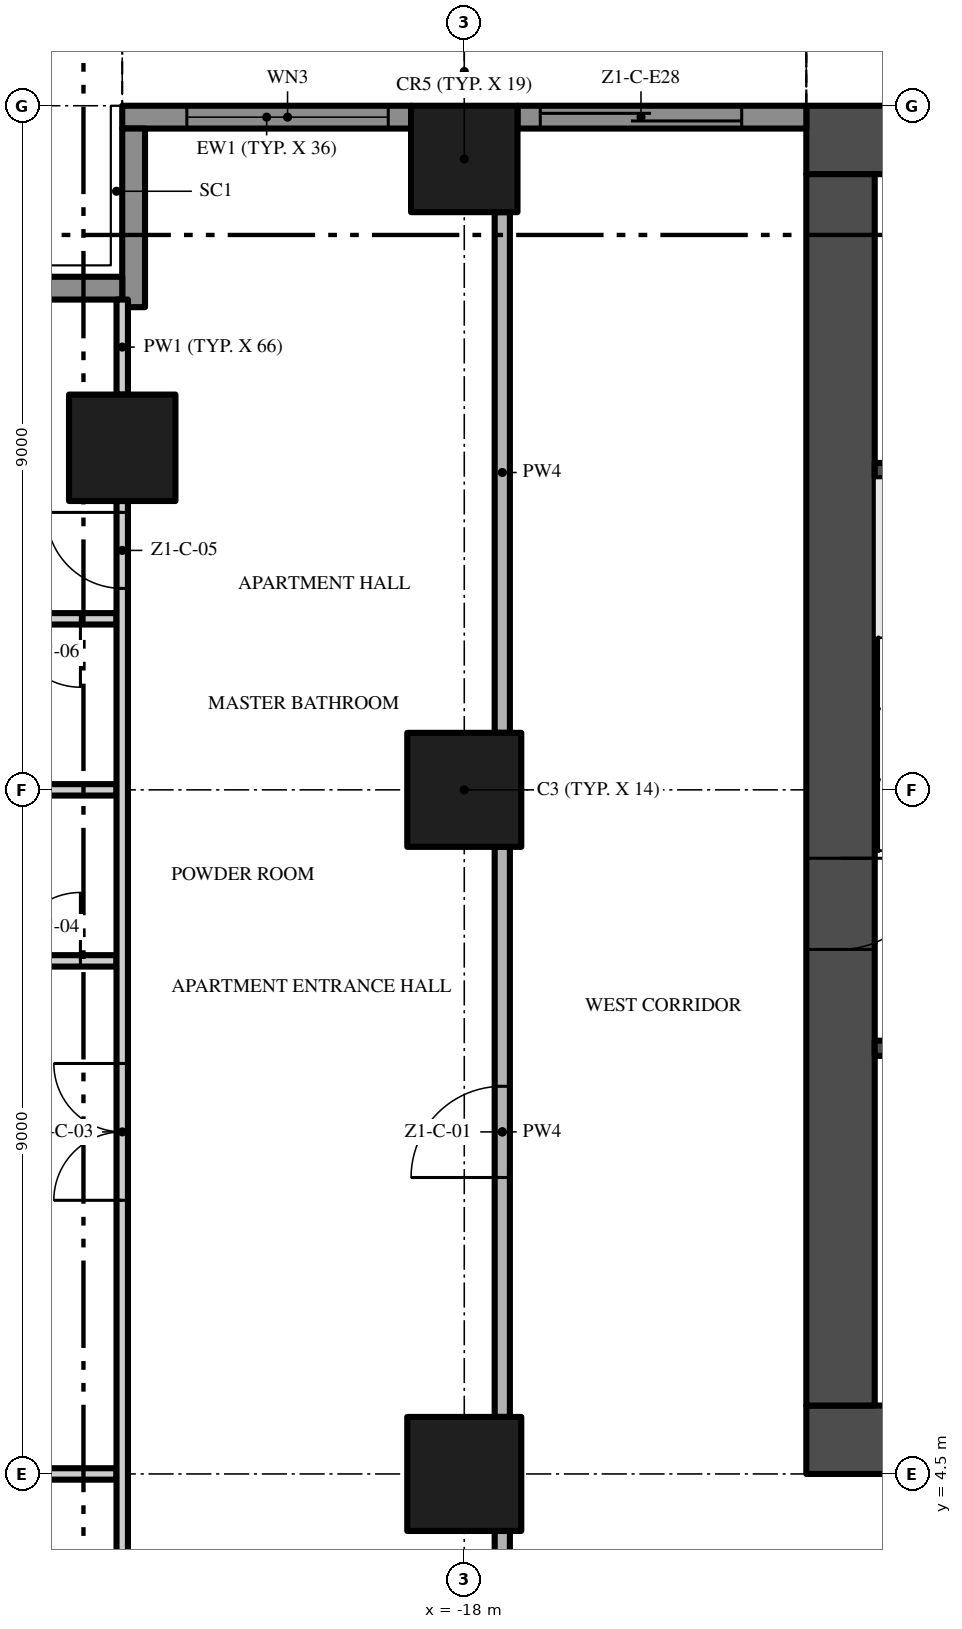
"""IFC4 building model, lengths in metres.
Left out: names, types, materials, properties, quantities, classifications, styles, units other than length and angle.
Written with IfcOpenShell. Run it as: python <this file> out.ifc"""

import sys

from ifc_helpers import new_model, si_unit, direction, frame, frame_2d, origin, origin_2d, place, context, subcontext, project, spatial, rectangle, extrude, element, fill, save


model = new_model("IFC4")
c1 = context("Model", 3, precision=1e-05, world=origin(), true_north=direction((0.0, 1.0)))
c2 = subcontext(c1, "Body", "Model", "MODEL_VIEW")
j1 = project(units=[si_unit("LENGTHUNIT", "METRE"), si_unit("PLANEANGLEUNIT", "RADIAN")], contexts=[c1])
p1 = place(None, origin())
s1 = spatial("IfcSite", under=j1, at=p1, CompositionType="ELEMENT")
p2 = place(p1, origin())
s2 = spatial("IfcBuilding", under=s1, at=p2, CompositionType="ELEMENT")
p3 = place(p2, frame((0.0, 0.0, 45.4)))
s3 = spatial("IfcBuildingStorey", under=s2, at=p3, CompositionType="ELEMENT", Elevation=45.4)
p4 = place(p3, frame((-13.5, 4.95, -0.3), z_axis=(0.0, 0.0, 1.0), x_axis=(1.0, 0.0, 0.0)))
e1 = element("IfcWall", 1, at=p4, inside=s3, PredefinedType="SHEAR", context=c2, shape_type="SweptSolid", body=[
    extrude(rectangle(XDim=27.0, YDim=0.9, at=frame_2d((13.5, 0.0))), origin(), (0.0, 0.0, 1.0), 3.8),
])
p5 = place(p4, frame((12.0, 0.0, 0.3)))
e2 = element("IfcOpeningElement", 2, at=p5, cuts=e1, PredefinedType="OPENING", context=c2, shape_type="SweptSolid", body=[
    extrude(rectangle(XDim=3.0, YDim=2.4, at=frame_2d((1.5, 1.2))), frame((0.0, 0.46, 0.0), z_axis=(0.0, -1.0, 0.0), x_axis=(1.0, 0.0, 0.0)), (0.0, 0.0, 1.0), 0.92),
])
p6 = place(p4, frame((4.9, 0.0, 0.3)))
e3 = element("IfcOpeningElement", 3, at=p6, cuts=e1, PredefinedType="OPENING", context=c2, shape_type="SweptSolid", body=[
    extrude(rectangle(XDim=1.2, YDim=2.2, at=frame_2d((0.6, 1.1))), frame((0.0, 0.46, 0.0), z_axis=(0.0, -1.0, 0.0), x_axis=(1.0, 0.0, 0.0)), (0.0, 0.0, 1.0), 0.92),
])
p7 = place(p4, frame((20.75, 0.0, 0.3)))
e4 = element("IfcOpeningElement", 4, at=p7, cuts=e1, PredefinedType="OPENING", context=c2, shape_type="SweptSolid", body=[
    extrude(rectangle(XDim=1.5, YDim=2.2, at=frame_2d((0.75, 1.1))), frame((0.0, 0.46, 0.0), z_axis=(0.0, -1.0, 0.0), x_axis=(1.0, 0.0, 0.0)), (0.0, 0.0, 1.0), 0.92),
])
p8 = place(p4, frame((17.4, 0.0, 0.3)))
e5 = element("IfcOpeningElement", 5, at=p8, cuts=e1, PredefinedType="OPENING", context=c2, shape_type="SweptSolid", body=[
    extrude(rectangle(XDim=1.2, YDim=2.2, at=frame_2d((0.6, 1.1))), frame((0.0, 0.46, 0.0), z_axis=(0.0, -1.0, 0.0), x_axis=(1.0, 0.0, 0.0)), (0.0, 0.0, 1.0), 0.92),
])
p9 = place(p3, frame((13.5, 22.05, -0.3), z_axis=(0.0, 0.0, 1.0), x_axis=(-1.0, 0.0, 0.0)))
e6 = element("IfcWall", 6, at=p9, inside=s3, PredefinedType="SHEAR", context=c2, shape_type="SweptSolid", body=[
    extrude(rectangle(XDim=27.0, YDim=0.9, at=frame_2d((13.5, 0.0))), origin(), (0.0, 0.0, 1.0), 3.8),
])
p10 = place(p3, frame((-13.05, 21.6, -0.3), z_axis=(0.0, 0.0, 1.0), x_axis=(0.0, -1.0, 0.0)))
e7 = element("IfcWall", 7, at=p10, inside=s3, PredefinedType="SHEAR", context=c2, shape_type="SweptSolid", body=[
    extrude(rectangle(XDim=16.2, YDim=0.9, at=frame_2d((8.1, 0.0))), origin(), (0.0, 0.0, 1.0), 3.8),
])
p11 = place(p10, frame((9.0, 0.0, 0.3)))
e8 = element("IfcOpeningElement", 8, at=p11, cuts=e7, PredefinedType="OPENING", context=c2, shape_type="SweptSolid", body=[
    extrude(rectangle(XDim=1.2, YDim=2.2, at=frame_2d((0.6, 1.1))), frame((0.0, 0.46, 0.0), z_axis=(0.0, -1.0, 0.0), x_axis=(1.0, 0.0, 0.0)), (0.0, 0.0, 1.0), 0.92),
])
p12 = place(p3, frame((-18.0, 13.5, 0.0), z_axis=(0.0, 0.0, 1.0), x_axis=(1.0, 0.0, 0.0)))
e9 = element("IfcColumn", 9, at=p12, inside=s3, PredefinedType="COLUMN", context=c2, shape_type="SweptSolid", body=[
    extrude(rectangle(XDim=1.5, YDim=1.5, at=origin_2d()), origin(), (0.0, 0.0, 1.0), 3.5),
])
p13 = place(p3, frame((-18.0, 21.8, 0.0), z_axis=(0.0, 0.0, 1.0), x_axis=(1.0, 0.0, 0.0)))
e10 = element("IfcColumn", 10, at=p13, inside=s3, PredefinedType="COLUMN", context=c2, shape_type="SweptSolid", body=[
    extrude(rectangle(XDim=1.4, YDim=1.4, at=origin_2d()), origin(), (0.0, 0.0, 1.0), 3.5),
])
p14 = place(p3, frame((-18.0, 4.5, 0.0), z_axis=(0.0, 0.0, 1.0), x_axis=(1.0, 0.0, 0.0)))
e11 = element("IfcColumn", 11, at=p14, inside=s3, PredefinedType="COLUMN", context=c2, shape_type="SweptSolid", body=[
    extrude(rectangle(XDim=1.5, YDim=1.5, at=origin_2d()), origin(), (0.0, 0.0, 1.0), 3.5),
])
p15 = place(p3, frame((-22.5, 18.0, 0.0), z_axis=(0.0, 0.0, 1.0), x_axis=(1.0, 0.0, 0.0)))
e12 = element("IfcColumn", 12, at=p15, inside=s3, PredefinedType="COLUMN", context=c2, shape_type="SweptSolid", body=[
    extrude(rectangle(XDim=1.4, YDim=1.4, at=origin_2d()), origin(), (0.0, 0.0, 1.0), 3.5),
])
p16 = place(p3, frame((-17.3, 22.35, 0.0), z_axis=(0.0, 0.0, 1.0), x_axis=(1.0, 0.0, 0.0)))
e13 = element("IfcWall", 13, at=p16, inside=s3, PredefinedType="SOLIDWALL", context=c2, shape_type="SweptSolid", body=[
    extrude(rectangle(XDim=3.8, YDim=0.3, at=frame_2d((1.9, 0.0))), origin(), (0.0, 0.0, 1.0), 3.5),
])
p17 = place(p16, frame((0.3, 0.0, 0.0)))
e14 = element("IfcOpeningElement", 14, at=p17, cuts=e13, PredefinedType="OPENING", context=c2, shape_type="SweptSolid", body=[
    extrude(rectangle(XDim=2.65, YDim=2.4, at=frame_2d((1.325, 1.2))), frame((0.0, 0.16, 0.0), z_axis=(0.0, -1.0, 0.0), x_axis=(1.0, 0.0, 0.0)), (0.0, 0.0, 1.0), 0.32),
])
p18 = place(p3, frame((-22.5, 22.35, 0.0), z_axis=(0.0, 0.0, 1.0), x_axis=(1.0, 0.0, 0.0)))
e15 = element("IfcWall", 15, at=p18, inside=s3, PredefinedType="SOLIDWALL", context=c2, shape_type="SweptSolid", body=[
    extrude(rectangle(XDim=3.8, YDim=0.3, at=frame_2d((1.9, 0.0))), origin(), (0.0, 0.0, 1.0), 3.5),
])
p19 = place(p18, frame((0.85, 0.0, 0.45)))
e16 = element("IfcOpeningElement", 16, at=p19, cuts=e15, PredefinedType="OPENING", context=c2, shape_type="SweptSolid", body=[
    extrude(rectangle(XDim=2.65, YDim=2.65, at=frame_2d((1.325, 1.325))), frame((0.0, 0.16, 0.0), z_axis=(0.0, -1.0, 0.0), x_axis=(1.0, 0.0, 0.0)), (0.0, 0.0, 1.0), 0.32),
])
p20 = place(p3, frame((-22.35, 19.85, 0.0), z_axis=(0.0, 0.0, 1.0), x_axis=(0.0, 1.0, 0.0)))
e17 = element("IfcWall", 17, at=p20, inside=s3, PredefinedType="SOLIDWALL", context=c2, shape_type="SweptSolid", body=[
    extrude(rectangle(XDim=2.35, YDim=0.3, at=frame_2d((1.175, 0.0))), origin(), (0.0, 0.0, 1.0), 3.5),
])
p21 = place(p3, frame((-24.75, 20.1, 0.0), z_axis=(0.0, 0.0, 1.0), x_axis=(1.0, 0.0, 0.0)))
e18 = element("IfcWall", 18, at=p21, inside=s3, PredefinedType="SOLIDWALL", context=c2, shape_type="SweptSolid", body=[
    extrude(rectangle(XDim=2.25, YDim=0.3, at=frame_2d((1.125, 0.0))), origin(), (0.0, 0.0, 1.0), 3.5),
])
for number, where, z_axis, x_axis in (
    (19, (-12.6, 10.1, 0.0), (0.0, 0.0, 1.0), (1.0, 0.0, 0.0)),
    (20, (-12.6, 17.7, 0.0), (0.0, 0.0, 1.0), (1.0, 0.0, 0.0)),
):
    element("IfcWall", number, at=place(p3, frame(where, z_axis=z_axis, x_axis=x_axis)), inside=s3, PredefinedType="SHEAR", context=c2, shape_type="SweptSolid", body=[
        extrude(rectangle(XDim=2.95, YDim=0.2, at=frame_2d((1.475, 0.0))), origin(), (0.0, 0.0, 1.0), 3.5),
    ])
p22 = place(p3, frame((-25.6, 4.5, 0.0), z_axis=(0.0, 0.0, 1.0), x_axis=(1.0, 0.0, 0.0)))
e21 = element("IfcWall", 21, at=p22, inside=s3, PredefinedType="PARTITIONING", context=c2, shape_type="SweptSolid", body=[
    extrude(rectangle(XDim=3.025, YDim=0.15, at=frame_2d((1.512, 0.0))), origin(), (0.0, 0.0, 1.0), 3.5),
])
p23 = place(p3, frame((-24.45, 11.25, 0.0), z_axis=(0.0, 0.0, 1.0), x_axis=(1.0, 0.0, 0.0)))
e22 = element("IfcWall", 22, at=p23, inside=s3, PredefinedType="PARTITIONING", context=c2, shape_type="SweptSolid", body=[
    extrude(rectangle(XDim=1.875, YDim=0.15, at=frame_2d((0.938, 0.0))), origin(), (0.0, 0.0, 1.0), 3.5),
])
p24 = place(p23, frame((0.5, 0.0, 0.0)))
e23 = element("IfcOpeningElement", 23, at=p24, cuts=e22, PredefinedType="OPENING", context=c2, shape_type="SweptSolid", body=[
    extrude(rectangle(XDim=0.9, YDim=2.1, at=frame_2d((0.45, 1.05))), frame((0.0, 0.085, 0.0), z_axis=(0.0, -1.0, 0.0), x_axis=(1.0, 0.0, 0.0)), (0.0, 0.0, 1.0), 0.17),
])
p25 = place(p3, frame((-24.45, 13.5, 0.0), z_axis=(0.0, 0.0, 1.0), x_axis=(1.0, 0.0, 0.0)))
e24 = element("IfcWall", 24, at=p25, inside=s3, PredefinedType="PARTITIONING", context=c2, shape_type="SweptSolid", body=[
    extrude(rectangle(XDim=1.875, YDim=0.15, at=frame_2d((0.938, 0.0))), origin(), (0.0, 0.0, 1.0), 3.5),
])
p26 = place(p3, frame((-22.575, 15.75, 0.0), z_axis=(0.0, 0.0, 1.0), x_axis=(-1.0, 0.0, 0.0)))
e25 = element("IfcWall", 25, at=p26, inside=s3, PredefinedType="PARTITIONING", context=c2, shape_type="SweptSolid", body=[
    extrude(rectangle(XDim=1.875, YDim=0.15, at=frame_2d((0.938, 0.0))), origin(), (0.0, 0.0, 1.0), 3.5),
])
p27 = place(p26, frame((0.475, 0.0, 0.0)))
e26 = element("IfcOpeningElement", 26, at=p27, cuts=e25, PredefinedType="OPENING", context=c2, shape_type="SweptSolid", body=[
    extrude(rectangle(XDim=0.9, YDim=2.1, at=frame_2d((0.45, 1.05))), frame((0.0, 0.085, 0.0), z_axis=(0.0, -1.0, 0.0), x_axis=(1.0, 0.0, 0.0)), (0.0, 0.0, 1.0), 0.17),
])
p28 = place(p3, frame((-22.5, 0.1, 0.0), z_axis=(0.0, 0.0, 1.0), x_axis=(0.0, 1.0, 0.0)))
e27 = element("IfcWall", 27, at=p28, inside=s3, PredefinedType="PARTITIONING", context=c2, shape_type="SweptSolid", body=[
    extrude(rectangle(XDim=17.2, YDim=0.15, at=frame_2d((8.6, 0.0))), origin(), (0.0, 0.0, 1.0), 3.5),
])
p29 = place(p28, frame((1.65, 0.0, 0.0)))
e28 = element("IfcOpeningElement", 28, at=p29, cuts=e27, PredefinedType="OPENING", context=c2, shape_type="SweptSolid", body=[
    extrude(rectangle(XDim=1.0, YDim=2.4, at=frame_2d((0.5, 1.2))), frame((0.0, 0.085, 0.0), z_axis=(0.0, -1.0, 0.0), x_axis=(1.0, 0.0, 0.0)), (0.0, 0.0, 1.0), 0.17),
])
p30 = place(p28, frame((8.0, 0.0, 0.0)))
e29 = element("IfcOpeningElement", 29, at=p30, cuts=e27, PredefinedType="OPENING", context=c2, shape_type="SweptSolid", body=[
    extrude(rectangle(XDim=1.8, YDim=2.4, at=frame_2d((0.9, 1.2))), frame((0.0, 0.085, 0.0), z_axis=(0.0, -1.0, 0.0), x_axis=(1.0, 0.0, 0.0)), (0.0, 0.0, 1.0), 0.17),
])
p31 = place(p28, frame((16.05, 0.0, 0.0)))
e30 = element("IfcOpeningElement", 30, at=p31, cuts=e27, PredefinedType="OPENING", context=c2, shape_type="SweptSolid", body=[
    extrude(rectangle(XDim=1.0, YDim=2.4, at=frame_2d((0.5, 1.2))), frame((0.0, 0.085, 0.0), z_axis=(0.0, -1.0, 0.0), x_axis=(1.0, 0.0, 0.0)), (0.0, 0.0, 1.0), 0.17),
])
p32 = place(p3, frame((-22.5, 18.7, 0.0), z_axis=(0.0, 0.0, 1.0), x_axis=(0.0, 1.0, 0.0)))
e31 = element("IfcWall", 31, at=p32, inside=s3, PredefinedType="PARTITIONING", context=c2, shape_type="SweptSolid", body=[
    extrude(rectangle(XDim=1.25, YDim=0.15, at=frame_2d((0.625, 0.0))), origin(), (0.0, 0.0, 1.0), 3.5),
])
p33 = place(p3, frame((-17.5, -0.2, 0.0), z_axis=(0.0, 0.0, 1.0), x_axis=(0.0, 1.0, 0.0)))
e32 = element("IfcWall", 32, at=p33, inside=s3, PredefinedType="PARTITIONING", context=c2, shape_type="SweptSolid", body=[
    extrude(rectangle(XDim=3.95, YDim=0.2, at=frame_2d((1.975, 0.0))), origin(), (0.0, 0.0, 1.0), 3.5),
])
p34 = place(p3, frame((-17.5, 5.25, 0.0), z_axis=(0.0, 0.0, 1.0), x_axis=(0.0, 1.0, 0.0)))
e33 = element("IfcWall", 33, at=p34, inside=s3, PredefinedType="PARTITIONING", context=c2, shape_type="SweptSolid", body=[
    extrude(rectangle(XDim=7.5, YDim=0.2, at=frame_2d((3.75, 0.0))), origin(), (0.0, 0.0, 1.0), 3.5),
])
p35 = place(p34, frame((3.15, 0.0, 0.0)))
e34 = element("IfcOpeningElement", 34, at=p35, cuts=e33, PredefinedType="OPENING", context=c2, shape_type="SweptSolid", body=[
    extrude(rectangle(XDim=1.2, YDim=2.4, at=frame_2d((0.6, 1.2))), frame((0.0, 0.11, 0.0), z_axis=(0.0, -1.0, 0.0), x_axis=(1.0, 0.0, 0.0)), (0.0, 0.0, 1.0), 0.22),
])
p36 = place(p3, frame((-17.5, 14.25, 0.0), z_axis=(0.0, 0.0, 1.0), x_axis=(0.0, 1.0, 0.0)))
e35 = element("IfcWall", 35, at=p36, inside=s3, PredefinedType="PARTITIONING", context=c2, shape_type="SweptSolid", body=[
    extrude(rectangle(XDim=6.85, YDim=0.2, at=frame_2d((3.425, 0.0))), origin(), (0.0, 0.0, 1.0), 3.5),
])
p37 = place(p17, origin())
e36 = element("IfcDoor", 36, at=p37, inside=s3, OperationType="SINGLE_SWING_LEFT", PredefinedType="DOOR", context=c2, shape_type="SweptSolid", body=[
    extrude(rectangle(XDim=2.65, YDim=2.4, at=frame_2d((1.325, 1.2))), frame((0.0, 0.025, 0.0), z_axis=(0.0, -1.0, 0.0), x_axis=(1.0, 0.0, 0.0)), (0.0, 0.0, 1.0), 0.05),
])
fill(e14, e36)
p38 = place(p19, origin())
e37 = element("IfcWindow", 37, at=p38, inside=s3, PartitioningType="SINGLE_PANEL", PredefinedType="WINDOW", context=c2, shape_type="SweptSolid", body=[
    extrude(rectangle(XDim=2.65, YDim=2.65, at=frame_2d((1.325, 1.325))), frame((0.0, 0.03, 0.0), z_axis=(0.0, -1.0, 0.0), x_axis=(1.0, 0.0, 0.0)), (0.0, 0.0, 1.0), 0.06),
])
fill(e16, e37)
p39 = place(p11, frame((1.2, 0.0, 0.0), z_axis=(0.0, 0.0, 1.0), x_axis=(-1.0, 0.0, 0.0)))
e38 = element("IfcDoor", 38, at=p39, inside=s3, OperationType="SINGLE_SWING_RIGHT", PredefinedType="DOOR", context=c2, shape_type="SweptSolid", body=[
    extrude(rectangle(XDim=1.2, YDim=2.2, at=frame_2d((0.6, 1.1))), frame((0.0, 0.025, 0.0), z_axis=(0.0, -1.0, 0.0), x_axis=(1.0, 0.0, 0.0)), (0.0, 0.0, 1.0), 0.05),
])
fill(e8, e38)
p40 = place(p35, origin())
e39 = element("IfcDoor", 39, at=p40, inside=s3, OperationType="SINGLE_SWING_LEFT", PredefinedType="DOOR", context=c2, shape_type="SweptSolid", body=[
    extrude(rectangle(XDim=1.2, YDim=2.4, at=frame_2d((0.6, 1.2))), frame((0.0, 0.025, 0.0), z_axis=(0.0, -1.0, 0.0), x_axis=(1.0, 0.0, 0.0)), (0.0, 0.0, 1.0), 0.05),
])
fill(e34, e39)
p41 = place(p30, origin())
e40 = element("IfcDoor", 40, at=p41, inside=s3, OperationType="DOUBLE_DOOR_SINGLE_SWING", PredefinedType="DOOR", context=c2, shape_type="SweptSolid", body=[
    extrude(rectangle(XDim=1.8, YDim=2.4, at=frame_2d((0.9, 1.2))), frame((0.0, 0.025, 0.0), z_axis=(0.0, -1.0, 0.0), x_axis=(1.0, 0.0, 0.0)), (0.0, 0.0, 1.0), 0.05),
])
fill(e29, e40)
p42 = place(p24, origin())
e41 = element("IfcDoor", 41, at=p42, inside=s3, OperationType="SINGLE_SWING_RIGHT", PredefinedType="DOOR", context=c2, shape_type="SweptSolid", body=[
    extrude(rectangle(XDim=0.9, YDim=2.1, at=frame_2d((0.45, 1.05))), frame((0.0, 0.025, 0.0), z_axis=(0.0, -1.0, 0.0), x_axis=(1.0, 0.0, 0.0)), (0.0, 0.0, 1.0), 0.05),
])
fill(e23, e41)
p43 = place(p31, origin())
e42 = element("IfcDoor", 42, at=p43, inside=s3, OperationType="SINGLE_SWING_RIGHT", PredefinedType="DOOR", context=c2, shape_type="SweptSolid", body=[
    extrude(rectangle(XDim=1.0, YDim=2.4, at=frame_2d((0.5, 1.2))), frame((0.0, 0.025, 0.0), z_axis=(0.0, -1.0, 0.0), x_axis=(1.0, 0.0, 0.0)), (0.0, 0.0, 1.0), 0.05),
])
fill(e30, e42)
p44 = place(p27, origin())
e43 = element("IfcDoor", 43, at=p44, inside=s3, OperationType="SINGLE_SWING_LEFT", PredefinedType="DOOR", context=c2, shape_type="SweptSolid", body=[
    extrude(rectangle(XDim=0.9, YDim=2.1, at=frame_2d((0.45, 1.05))), frame((0.0, 0.025, 0.0), z_axis=(0.0, -1.0, 0.0), x_axis=(1.0, 0.0, 0.0)), (0.0, 0.0, 1.0), 0.05),
])
fill(e26, e43)
save(model, sys.argv[1])
